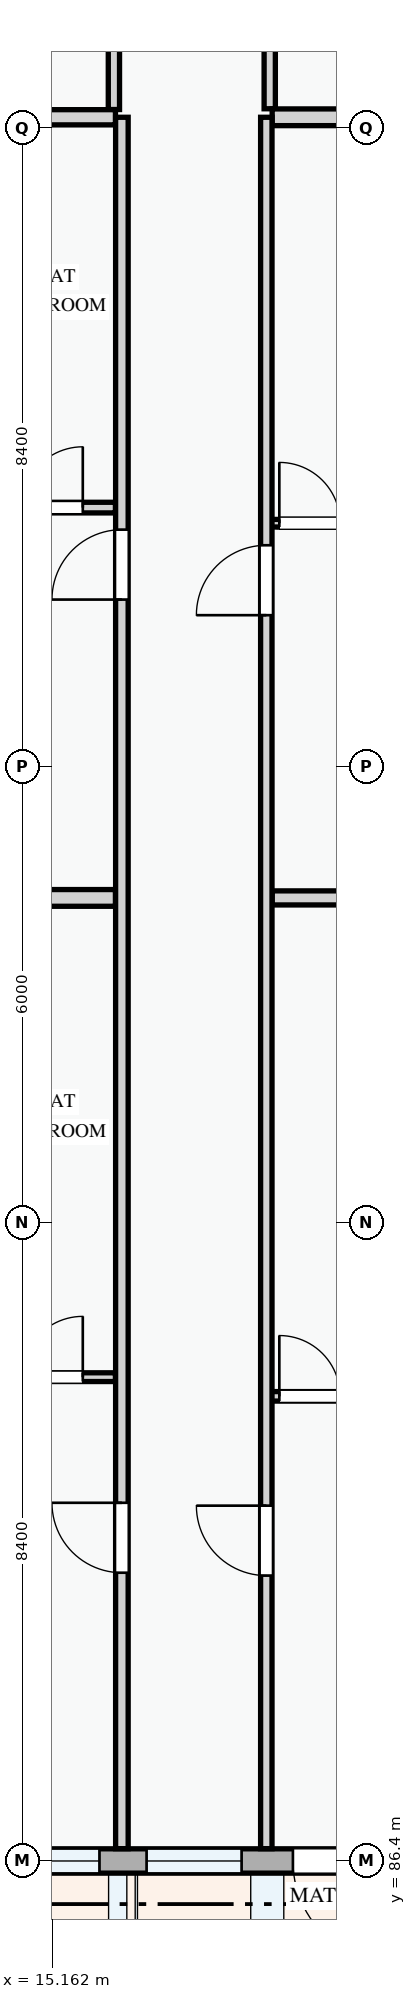
"""IFC4 building model, lengths in metres.
Left out: names, types, materials, properties, quantities, classifications, styles, units other than length and angle.
Written with IfcOpenShell. Run it as: python <this file> out.ifc"""

import sys

from ifc_helpers import new_model, si_unit, direction, frame, frame_2d, origin, place, context, subcontext, project, spatial, rectangle, extrude, element, fill, save


model = new_model("IFC4")
c1 = context("Model", 3, precision=1e-05, world=origin(), true_north=direction((0.0, 1.0)))
c2 = subcontext(c1, "Body", "Model", "MODEL_VIEW")
j1 = project(units=[si_unit("LENGTHUNIT", "METRE"), si_unit("PLANEANGLEUNIT", "RADIAN")], contexts=[c1])
p1 = place(None, origin())
s1 = spatial("IfcSite", under=j1, at=p1, CompositionType="ELEMENT")
p2 = place(p1, origin())
s2 = spatial("IfcBuilding", under=s1, at=p2, CompositionType="ELEMENT")
p3 = place(p2, frame((0.0, 0.0, 21.3)))
s3 = spatial("IfcBuildingStorey", under=s2, at=p3, CompositionType="ELEMENT", Elevation=21.3)
p4 = place(p3, frame((14.4, 86.4, 0.0), z_axis=(0.0, 0.0, 1.0), x_axis=(1.0, 0.0, 0.0)))
e1 = element("IfcWall", 1, at=p4, inside=s3, PredefinedType="STANDARD", context=c2, shape_type="SweptSolid", body=[
    extrude(rectangle(XDim=8.4, YDim=0.32, at=frame_2d((4.2, 0.0))), origin(), (0.0, 0.0, 1.0), 2.375),
])
p5 = place(p4, frame((3.93, 0.0, 0.0)))
e2 = element("IfcOpeningElement", 2, at=p5, cuts=e1, PredefinedType="OPENING", context=c2, shape_type="SweptSolid", body=[
    extrude(rectangle(XDim=1.35, YDim=2.2, at=frame_2d((0.675, 1.1))), frame((0.0, 0.17, 0.0), z_axis=(0.0, -1.0, 0.0), x_axis=(1.0, 0.0, 0.0)), (0.0, 0.0, 1.0), 0.34),
])
p6 = place(p4, frame((6.18, 0.0, 0.78)))
e3 = element("IfcOpeningElement", 3, at=p6, cuts=e1, PredefinedType="OPENING", context=c2, shape_type="SweptSolid", body=[
    extrude(rectangle(XDim=1.2, YDim=1.35, at=frame_2d((0.6, 0.675))), frame((0.0, 0.17, 0.0), z_axis=(0.0, -1.0, 0.0), x_axis=(1.0, 0.0, 0.0)), (0.0, 0.0, 1.0), 0.34),
])
p7 = place(p4, frame((0.485, 0.0, 0.78)))
e4 = element("IfcOpeningElement", 4, at=p7, cuts=e1, PredefinedType="OPENING", context=c2, shape_type="SweptSolid", body=[
    extrude(rectangle(XDim=0.9, YDim=1.2, at=frame_2d((0.45, 0.6))), frame((0.0, 0.17, 0.0), z_axis=(0.0, -1.0, 0.0), x_axis=(1.0, 0.0, 0.0)), (0.0, 0.0, 1.0), 0.34),
])
p8 = place(p4, frame((2.005, 0.0, 0.78)))
e5 = element("IfcOpeningElement", 5, at=p8, cuts=e1, PredefinedType="OPENING", context=c2, shape_type="SweptSolid", body=[
    extrude(rectangle(XDim=1.25, YDim=1.45, at=frame_2d((0.625, 0.725))), frame((0.0, 0.17, 0.0), z_axis=(0.0, -1.0, 0.0), x_axis=(1.0, 0.0, 0.0)), (0.0, 0.0, 1.0), 0.34),
])
p9 = place(p3, frame((15.975, 113.324, 0.0), z_axis=(0.0, 0.0, 1.0), x_axis=(0.0, -1.0, 0.0)))
e6 = element("IfcWall", 6, at=p9, inside=s3, PredefinedType="PARTITIONING", context=c2, shape_type="SweptSolid", body=[
    extrude(rectangle(XDim=3.882, YDim=0.148, at=frame_2d((1.941, 0.0))), origin(), (0.0, 0.0, 1.0), 3.0),
])
p10 = place(p3, frame((18.025, 113.324, 0.0), z_axis=(0.0, 0.0, 1.0), x_axis=(0.0, -1.0, 0.0)))
e7 = element("IfcWall", 7, at=p10, inside=s3, PredefinedType="PARTITIONING", context=c2, shape_type="SweptSolid", body=[
    extrude(rectangle(XDim=3.872, YDim=0.148, at=frame_2d((1.936, 0.0))), origin(), (0.0, 0.0, 1.0), 3.0),
])
p11 = place(p3, frame((8.562, 92.765, 0.0), z_axis=(0.0, 0.0, 1.0), x_axis=(1.0, 0.0, 0.0)))
e8 = element("IfcWall", 8, at=p11, inside=s3, PredefinedType="PARTITIONING", context=c2, shape_type="SweptSolid", body=[
    extrude(rectangle(XDim=7.434, YDim=0.115, at=frame_2d((3.717, 0.0))), origin(), (0.0, 0.0, 1.0), 3.0),
])
p12 = place(p11, frame((1.302, 0.0, 0.0)))
e9 = element("IfcOpeningElement", 9, at=p12, cuts=e8, PredefinedType="OPENING", context=c2, shape_type="SweptSolid", body=[
    extrude(rectangle(XDim=0.85, YDim=2.1, at=frame_2d((0.425, 1.05))), frame((0.0, 0.067, 0.0), z_axis=(0.0, -1.0, 0.0), x_axis=(1.0, 0.0, 0.0)), (0.0, 0.0, 1.0), 0.135),
])
p13 = place(p11, frame((4.198, 0.0, 0.0)))
e10 = element("IfcOpeningElement", 10, at=p13, cuts=e8, PredefinedType="OPENING", context=c2, shape_type="SweptSolid", body=[
    extrude(rectangle(XDim=0.85, YDim=2.1, at=frame_2d((0.425, 1.05))), frame((0.0, 0.067, 0.0), z_axis=(0.0, -1.0, 0.0), x_axis=(1.0, 0.0, 0.0)), (0.0, 0.0, 1.0), 0.135),
])
p14 = place(p11, frame((6.204, 0.0, 0.0)))
e11 = element("IfcOpeningElement", 11, at=p14, cuts=e8, PredefinedType="OPENING", context=c2, shape_type="SweptSolid", body=[
    extrude(rectangle(XDim=0.8, YDim=2.1, at=frame_2d((0.4, 1.05))), frame((0.0, 0.067, 0.0), z_axis=(0.0, -1.0, 0.0), x_axis=(1.0, 0.0, 0.0)), (0.0, 0.0, 1.0), 0.135),
])
p15 = place(p3, frame((17.98, 92.513, 0.0), z_axis=(0.0, 0.0, 1.0), x_axis=(1.0, 0.0, 0.0)))
e12 = element("IfcWall", 12, at=p15, inside=s3, PredefinedType="PARTITIONING", context=c2, shape_type="SweptSolid", body=[
    extrude(rectangle(XDim=4.658, YDim=0.125, at=frame_2d((2.329, 0.0))), origin(), (0.0, 0.0, 1.0), 3.0),
])
p16 = place(p15, frame((0.171, 0.0, 0.0)))
e13 = element("IfcOpeningElement", 13, at=p16, cuts=e12, PredefinedType="OPENING", context=c2, shape_type="SweptSolid", body=[
    extrude(rectangle(XDim=0.8, YDim=2.1, at=frame_2d((0.4, 1.05))), frame((0.0, 0.073, 0.0), z_axis=(0.0, -1.0, 0.0), x_axis=(1.0, 0.0, 0.0)), (0.0, 0.0, 1.0), 0.145),
])
p17 = place(p15, frame((1.384, 0.0, 0.0)))
e14 = element("IfcOpeningElement", 14, at=p17, cuts=e12, PredefinedType="OPENING", context=c2, shape_type="SweptSolid", body=[
    extrude(rectangle(XDim=0.85, YDim=2.1, at=frame_2d((0.425, 1.05))), frame((0.0, 0.073, 0.0), z_axis=(0.0, -1.0, 0.0), x_axis=(1.0, 0.0, 0.0)), (0.0, 0.0, 1.0), 0.145),
])
p18 = place(p15, frame((3.193, 0.0, 0.0)))
e15 = element("IfcOpeningElement", 15, at=p18, cuts=e12, PredefinedType="OPENING", context=c2, shape_type="SweptSolid", body=[
    extrude(rectangle(XDim=0.85, YDim=2.1, at=frame_2d((0.425, 1.05))), frame((0.0, 0.073, 0.0), z_axis=(0.0, -1.0, 0.0), x_axis=(1.0, 0.0, 0.0)), (0.0, 0.0, 1.0), 0.145),
])
p19 = place(p3, frame((8.562, 104.205, 0.0), z_axis=(0.0, 0.0, 1.0), x_axis=(1.0, 0.0, 0.0)))
e16 = element("IfcWall", 16, at=p19, inside=s3, PredefinedType="PARTITIONING", context=c2, shape_type="SweptSolid", body=[
    extrude(rectangle(XDim=7.434, YDim=0.14, at=frame_2d((3.717, 0.0))), origin(), (0.0, 0.0, 1.0), 3.0),
])
p20 = place(p19, frame((1.302, 0.0, 0.0)))
e17 = element("IfcOpeningElement", 17, at=p20, cuts=e16, PredefinedType="OPENING", context=c2, shape_type="SweptSolid", body=[
    extrude(rectangle(XDim=0.85, YDim=2.1, at=frame_2d((0.425, 1.05))), frame((0.0, 0.08, 0.0), z_axis=(0.0, -1.0, 0.0), x_axis=(1.0, 0.0, 0.0)), (0.0, 0.0, 1.0), 0.16),
])
p21 = place(p19, frame((4.198, 0.0, 0.0)))
e18 = element("IfcOpeningElement", 18, at=p21, cuts=e16, PredefinedType="OPENING", context=c2, shape_type="SweptSolid", body=[
    extrude(rectangle(XDim=0.82, YDim=2.08, at=frame_2d((0.41, 1.04))), frame((0.0, 0.08, 0.0), z_axis=(0.0, -1.0, 0.0), x_axis=(1.0, 0.0, 0.0)), (0.0, 0.0, 1.0), 0.16),
])
p22 = place(p19, frame((6.204, 0.0, 0.0)))
e19 = element("IfcOpeningElement", 19, at=p22, cuts=e16, PredefinedType="OPENING", context=c2, shape_type="SweptSolid", body=[
    extrude(rectangle(XDim=0.8, YDim=2.1, at=frame_2d((0.4, 1.05))), frame((0.0, 0.08, 0.0), z_axis=(0.0, -1.0, 0.0), x_axis=(1.0, 0.0, 0.0)), (0.0, 0.0, 1.0), 0.16),
])
p23 = place(p3, frame((17.98, 104.0, 0.0), z_axis=(0.0, 0.0, 1.0), x_axis=(1.0, 0.0, 0.0)))
e20 = element("IfcWall", 20, at=p23, inside=s3, PredefinedType="PARTITIONING", context=c2, shape_type="SweptSolid", body=[
    extrude(rectangle(XDim=4.658, YDim=0.1, at=frame_2d((2.329, 0.0))), origin(), (0.0, 0.0, 1.0), 3.0),
])
p24 = place(p23, frame((0.171, 0.0, 0.0)))
e21 = element("IfcOpeningElement", 21, at=p24, cuts=e20, PredefinedType="OPENING", context=c2, shape_type="SweptSolid", body=[
    extrude(rectangle(XDim=0.8, YDim=2.1, at=frame_2d((0.4, 1.05))), frame((0.0, 0.06, 0.0), z_axis=(0.0, -1.0, 0.0), x_axis=(1.0, 0.0, 0.0)), (0.0, 0.0, 1.0), 0.12),
])
p25 = place(p23, frame((1.384, 0.0, 0.0)))
e22 = element("IfcOpeningElement", 22, at=p25, cuts=e20, PredefinedType="OPENING", context=c2, shape_type="SweptSolid", body=[
    extrude(rectangle(XDim=0.85, YDim=2.1, at=frame_2d((0.425, 1.05))), frame((0.0, 0.06, 0.0), z_axis=(0.0, -1.0, 0.0), x_axis=(1.0, 0.0, 0.0)), (0.0, 0.0, 1.0), 0.12),
])
p26 = place(p23, frame((3.193, 0.0, 0.0)))
e23 = element("IfcOpeningElement", 23, at=p26, cuts=e20, PredefinedType="OPENING", context=c2, shape_type="SweptSolid", body=[
    extrude(rectangle(XDim=0.82, YDim=2.08, at=frame_2d((0.41, 1.04))), frame((0.0, 0.06, 0.0), z_axis=(0.0, -1.0, 0.0), x_axis=(1.0, 0.0, 0.0)), (0.0, 0.0, 1.0), 0.12),
])
p27 = place(p3, frame((8.562, 99.07, 0.0), z_axis=(0.0, 0.0, 1.0), x_axis=(1.0, 0.0, 0.0)))
e24 = element("IfcWall", 24, at=p27, inside=s3, PredefinedType="PARTITIONING", context=c2, shape_type="SweptSolid", body=[
    extrude(rectangle(XDim=7.434, YDim=0.22, at=frame_2d((3.717, 0.0))), origin(), (0.0, 0.0, 1.0), 3.0),
])
p28 = place(p3, frame((18.057, 99.07, 0.0), z_axis=(0.0, 0.0, 1.0), x_axis=(1.0, 0.0, 0.0)))
e25 = element("IfcWall", 25, at=p28, inside=s3, PredefinedType="PARTITIONING", context=c2, shape_type="SweptSolid", body=[
    extrude(rectangle(XDim=4.581, YDim=0.185, at=frame_2d((2.291, 0.0))), origin(), (0.0, 0.0, 1.0), 3.0),
])
p29 = place(p3, frame((8.562, 109.34, 0.0), z_axis=(0.0, 0.0, 1.0), x_axis=(1.0, 0.0, 0.0)))
e26 = element("IfcWall", 26, at=p29, inside=s3, PredefinedType="PARTITIONING", context=c2, shape_type="SweptSolid", body=[
    extrude(rectangle(XDim=7.434, YDim=0.2, at=frame_2d((3.717, 0.0))), origin(), (0.0, 0.0, 1.0), 2.375),
])
p30 = place(p3, frame((18.057, 109.34, 0.0), z_axis=(0.0, 0.0, 1.0), x_axis=(1.0, 0.0, 0.0)))
e27 = element("IfcWall", 27, at=p30, inside=s3, PredefinedType="PARTITIONING", context=c2, shape_type="SweptSolid", body=[
    extrude(rectangle(XDim=4.683, YDim=0.22, at=frame_2d((2.342, 0.0))), origin(), (0.0, 0.0, 1.0), 2.375),
])
p31 = place(p3, frame((16.08, 86.562, 0.0), z_axis=(0.0, 0.0, 1.0), x_axis=(0.0, 1.0, 0.0)))
e28 = element("IfcWall", 28, at=p31, inside=s3, PredefinedType="PARTITIONING", context=c2, shape_type="SweptSolid", body=[
    extrude(rectangle(XDim=22.778, YDim=0.165, at=frame_2d((11.389, 0.0))), origin(), (0.0, 0.0, 1.0), 3.0),
])
p32 = place(p31, frame((3.63, 0.0, 0.0)))
e29 = element("IfcOpeningElement", 29, at=p32, cuts=e28, PredefinedType="OPENING", context=c2, shape_type="SweptSolid", body=[
    extrude(rectangle(XDim=0.92, YDim=2.1, at=frame_2d((0.46, 1.05))), frame((0.0, 0.093, 0.0), z_axis=(0.0, -1.0, 0.0), x_axis=(1.0, 0.0, 0.0)), (0.0, 0.0, 1.0), 0.185),
])
p33 = place(p31, frame((16.433, 0.0, 0.0)))
e30 = element("IfcOpeningElement", 30, at=p33, cuts=e28, PredefinedType="OPENING", context=c2, shape_type="SweptSolid", body=[
    extrude(rectangle(XDim=0.92, YDim=2.1, at=frame_2d((0.46, 1.05))), frame((0.0, 0.093, 0.0), z_axis=(0.0, -1.0, 0.0), x_axis=(1.0, 0.0, 0.0)), (0.0, 0.0, 1.0), 0.185),
])
p34 = place(p3, frame((17.98, 86.562, 0.0), z_axis=(0.0, 0.0, 1.0), x_axis=(0.0, 1.0, 0.0)))
e31 = element("IfcWall", 31, at=p34, inside=s3, PredefinedType="PARTITIONING", context=c2, shape_type="SweptSolid", body=[
    extrude(rectangle(XDim=22.778, YDim=0.15, at=frame_2d((11.389, 0.0))), origin(), (0.0, 0.0, 1.0), 3.0),
])
p35 = place(p34, frame((3.593, 0.0, 0.0)))
e32 = element("IfcOpeningElement", 32, at=p35, cuts=e31, PredefinedType="OPENING", context=c2, shape_type="SweptSolid", body=[
    extrude(rectangle(XDim=0.92, YDim=2.1, at=frame_2d((0.46, 1.05))), frame((0.0, 0.085, 0.0), z_axis=(0.0, -1.0, 0.0), x_axis=(1.0, 0.0, 0.0)), (0.0, 0.0, 1.0), 0.17),
])
p36 = place(p34, frame((16.228, 0.0, 0.0)))
e33 = element("IfcOpeningElement", 33, at=p36, cuts=e31, PredefinedType="OPENING", context=c2, shape_type="SweptSolid", body=[
    extrude(rectangle(XDim=0.92, YDim=2.1, at=frame_2d((0.46, 1.05))), frame((0.0, 0.085, 0.0), z_axis=(0.0, -1.0, 0.0), x_axis=(1.0, 0.0, 0.0)), (0.0, 0.0, 1.0), 0.17),
])
p37 = place(p5, frame((1.35, 0.0, 0.0), z_axis=(0.0, 0.0, 1.0), x_axis=(-1.0, 0.0, 0.0)))
e34 = element("IfcDoor", 34, at=p37, inside=s3, OperationType="SINGLE_SWING_LEFT", PredefinedType="DOOR", context=c2, shape_type="SweptSolid", body=[
    extrude(rectangle(XDim=1.35, YDim=2.2, at=frame_2d((0.675, 1.1))), frame((0.0, 0.025, 0.0), z_axis=(0.0, -1.0, 0.0), x_axis=(1.0, 0.0, 0.0)), (0.0, 0.0, 1.0), 0.05),
])
fill(e2, e34)
p38 = place(p7, origin())
e35 = element("IfcWindow", 35, at=p38, inside=s3, PartitioningType="SINGLE_PANEL", PredefinedType="WINDOW", context=c2, shape_type="SweptSolid", body=[
    extrude(rectangle(XDim=0.9, YDim=1.2, at=frame_2d((0.45, 0.6))), frame((0.0, 0.03, 0.0), z_axis=(0.0, -1.0, 0.0), x_axis=(1.0, 0.0, 0.0)), (0.0, 0.0, 1.0), 0.06),
])
fill(e4, e35)
p39 = place(p8, origin())
e36 = element("IfcWindow", 36, at=p39, inside=s3, PartitioningType="SINGLE_PANEL", PredefinedType="WINDOW", context=c2, shape_type="SweptSolid", body=[
    extrude(rectangle(XDim=1.25, YDim=1.45, at=frame_2d((0.625, 0.725))), frame((0.0, 0.03, 0.0), z_axis=(0.0, -1.0, 0.0), x_axis=(1.0, 0.0, 0.0)), (0.0, 0.0, 1.0), 0.06),
])
fill(e5, e36)
p40 = place(p14, origin())
e37 = element("IfcDoor", 37, at=p40, inside=s3, OperationType="SINGLE_SWING_RIGHT", PredefinedType="DOOR", context=c2, shape_type="SweptSolid", body=[
    extrude(rectangle(XDim=0.8, YDim=2.1, at=frame_2d((0.4, 1.05))), frame((0.0, 0.025, 0.0), z_axis=(0.0, -1.0, 0.0), x_axis=(1.0, 0.0, 0.0)), (0.0, 0.0, 1.0), 0.05),
])
fill(e11, e37)
p41 = place(p16, origin())
e38 = element("IfcDoor", 38, at=p41, inside=s3, OperationType="SINGLE_SWING_LEFT", PredefinedType="DOOR", context=c2, shape_type="SweptSolid", body=[
    extrude(rectangle(XDim=0.8, YDim=2.1, at=frame_2d((0.4, 1.05))), frame((0.0, 0.025, 0.0), z_axis=(0.0, -1.0, 0.0), x_axis=(1.0, 0.0, 0.0)), (0.0, 0.0, 1.0), 0.05),
])
fill(e13, e38)
p42 = place(p22, origin())
e39 = element("IfcDoor", 39, at=p42, inside=s3, OperationType="SINGLE_SWING_RIGHT", PredefinedType="DOOR", context=c2, shape_type="SweptSolid", body=[
    extrude(rectangle(XDim=0.8, YDim=2.1, at=frame_2d((0.4, 1.05))), frame((0.0, 0.025, 0.0), z_axis=(0.0, -1.0, 0.0), x_axis=(1.0, 0.0, 0.0)), (0.0, 0.0, 1.0), 0.05),
])
fill(e19, e39)
p43 = place(p24, origin())
e40 = element("IfcDoor", 40, at=p43, inside=s3, OperationType="SINGLE_SWING_LEFT", PredefinedType="DOOR", context=c2, shape_type="SweptSolid", body=[
    extrude(rectangle(XDim=0.8, YDim=2.1, at=frame_2d((0.4, 1.05))), frame((0.0, 0.025, 0.0), z_axis=(0.0, -1.0, 0.0), x_axis=(1.0, 0.0, 0.0)), (0.0, 0.0, 1.0), 0.05),
])
fill(e21, e40)
p44 = place(p32, origin())
e41 = element("IfcDoor", 41, at=p44, inside=s3, OperationType="SINGLE_SWING_RIGHT", PredefinedType="DOOR", context=c2, shape_type="SweptSolid", body=[
    extrude(rectangle(XDim=0.92, YDim=2.1, at=frame_2d((0.46, 1.05))), frame((0.0, 0.025, 0.0), z_axis=(0.0, -1.0, 0.0), x_axis=(1.0, 0.0, 0.0)), (0.0, 0.0, 1.0), 0.05),
])
fill(e29, e41)
p45 = place(p33, origin())
e42 = element("IfcDoor", 42, at=p45, inside=s3, OperationType="SINGLE_SWING_LEFT", PredefinedType="DOOR", context=c2, shape_type="SweptSolid", body=[
    extrude(rectangle(XDim=0.92, YDim=2.1, at=frame_2d((0.46, 1.05))), frame((0.0, 0.025, 0.0), z_axis=(0.0, -1.0, 0.0), x_axis=(1.0, 0.0, 0.0)), (0.0, 0.0, 1.0), 0.05),
])
fill(e30, e42)
p46 = place(p35, origin())
e43 = element("IfcDoor", 43, at=p46, inside=s3, OperationType="SINGLE_SWING_RIGHT", PredefinedType="DOOR", context=c2, shape_type="SweptSolid", body=[
    extrude(rectangle(XDim=0.92, YDim=2.1, at=frame_2d((0.46, 1.05))), frame((0.0, 0.025, 0.0), z_axis=(0.0, -1.0, 0.0), x_axis=(1.0, 0.0, 0.0)), (0.0, 0.0, 1.0), 0.05),
])
fill(e32, e43)
p47 = place(p36, origin())
e44 = element("IfcDoor", 44, at=p47, inside=s3, OperationType="SINGLE_SWING_LEFT", PredefinedType="DOOR", context=c2, shape_type="SweptSolid", body=[
    extrude(rectangle(XDim=0.92, YDim=2.1, at=frame_2d((0.46, 1.05))), frame((0.0, 0.025, 0.0), z_axis=(0.0, -1.0, 0.0), x_axis=(1.0, 0.0, 0.0)), (0.0, 0.0, 1.0), 0.05),
])
fill(e33, e44)
save(model, sys.argv[1])
